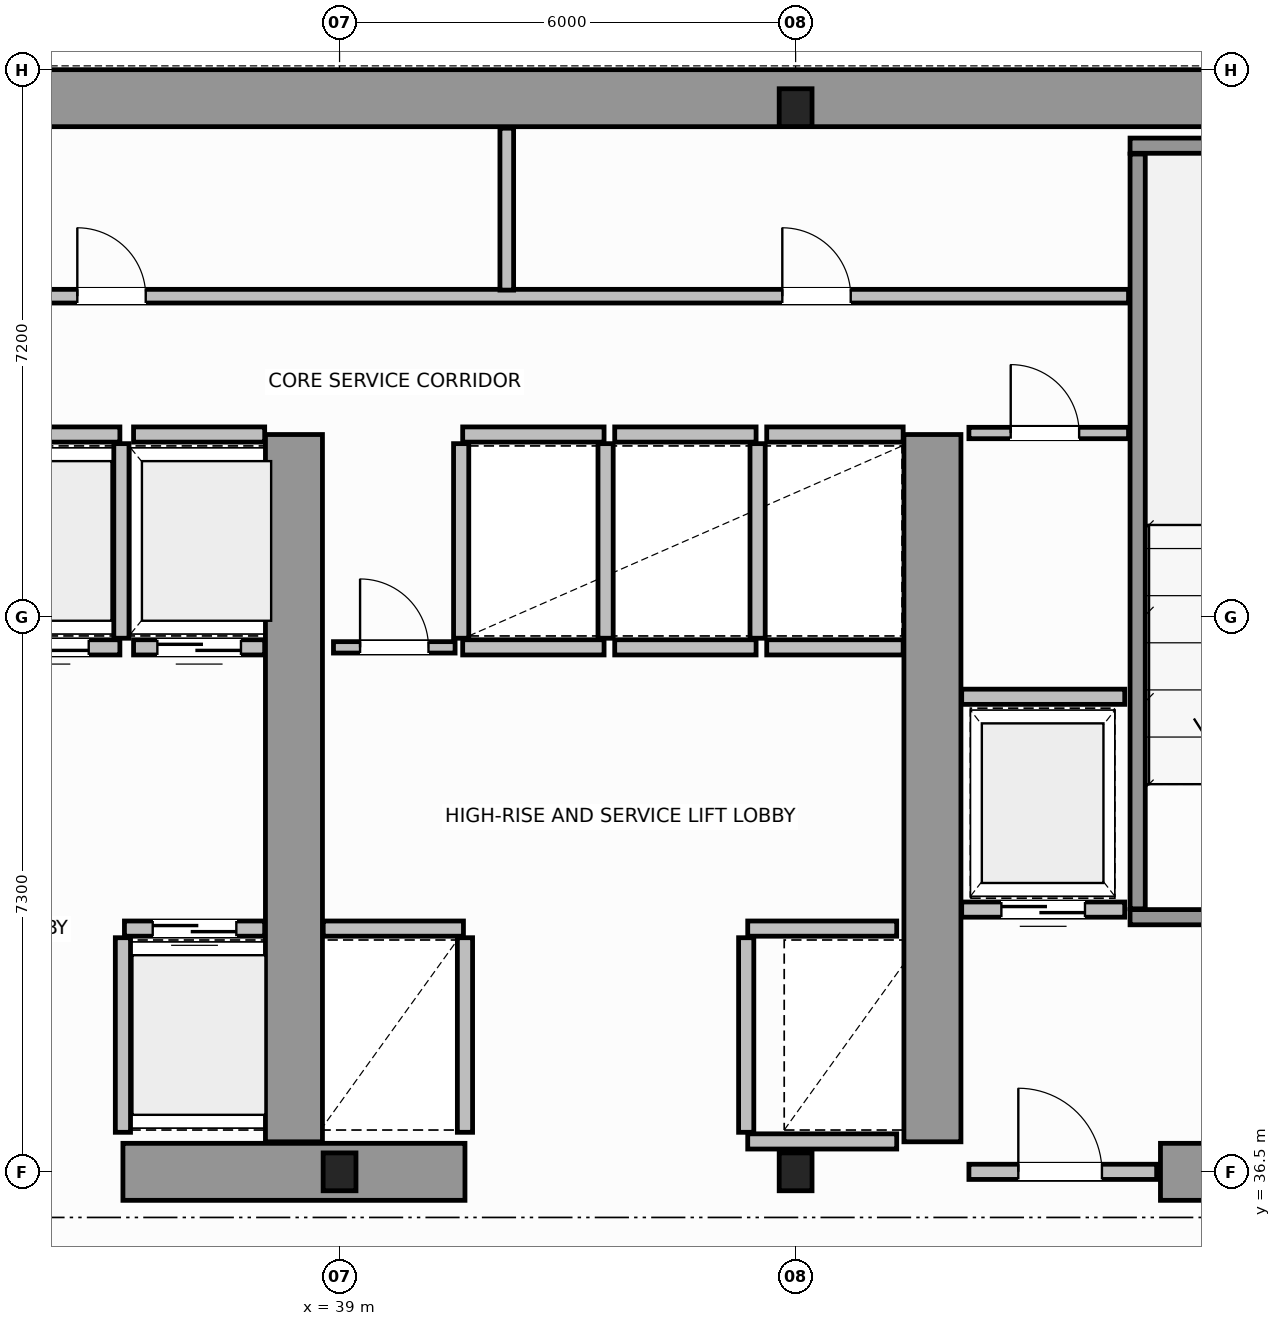
"""IFC4 building model, lengths in metres.
Left out: names, types, materials, properties, quantities, classifications, styles, units other than length and angle.
Written with IfcOpenShell. Run it as: python <this file> out.ifc"""

import sys

from ifc_helpers import new_model, si_unit, direction, frame, frame_2d, origin, origin_2d, place, context, subcontext, project, spatial, rectangle, i_section, extrude, source, transform, mapped, element, fill, save


model = new_model("IFC4")
c1 = context("Model", 3, precision=1e-05, world=origin(), true_north=direction((0.0, 1.0)))
c2 = subcontext(c1, "Body", "Model", "MODEL_VIEW")
j1 = project(units=[si_unit("LENGTHUNIT", "METRE"), si_unit("PLANEANGLEUNIT", "RADIAN")], contexts=[c1])
p1 = place(None, origin())
s1 = spatial("IfcSite", under=j1, at=p1, CompositionType="ELEMENT")
p2 = place(p1, origin())
s2 = spatial("IfcBuilding", under=s1, at=p2, CompositionType="ELEMENT")
p3 = place(p2, frame((0.0, 0.0, 145.2)))
s3 = spatial("IfcBuildingStorey", under=s2, at=p3, CompositionType="ELEMENT", Elevation=145.2)
m1 = source(origin(), c2, "Body", "SweptSolid", [
    extrude(i_section(OverallWidth=0.432, OverallDepth=0.498, WebThickness=0.055, FlangeThickness=0.068, FilletRadius=0.015, at=origin_2d()), origin(), (0.0, 0.0, 1.0), 3.8),
])
for number, where, z_axis, x_axis in (
    (1, (39.0, 36.5, 0.0), (0.0, 0.0, 1.0), (1.0, 0.0, 0.0)),
    (2, (45.0, 36.5, 0.0), (0.0, 0.0, 1.0), (1.0, 0.0, 0.0)),
    (3, (45.0, 50.5, 0.0), (0.0, 0.0, 1.0), (1.0, 0.0, 0.0)),
):
    element("IfcColumn", number, at=place(p3, frame(where, z_axis=z_axis, x_axis=x_axis)), inside=s3, PredefinedType="COLUMN", context=c2, shape_type="MappedRepresentation", body=[
        mapped(m1, transform((0.0, 0.0, 0.0), scale=1.0)),
    ])
p4 = place(p3, frame((34.002, 50.625, 0.0), z_axis=(0.0, 0.0, 1.0), x_axis=(1.0, 0.0, 0.0)))
e4 = element("IfcWall", 4, at=p4, inside=s3, PredefinedType="SHEAR", context=c2, shape_type="SweptSolid", body=[
    extrude(rectangle(XDim=19.619, YDim=0.75, at=frame_2d((9.81, 0.0))), origin(), (0.0, 0.0, 1.0), 3.8),
])
p5 = place(p3, frame((36.15, 36.5, 0.0), z_axis=(0.0, 0.0, 1.0), x_axis=(1.0, 0.0, 0.0)))
e5 = element("IfcWall", 5, at=p5, inside=s3, PredefinedType="SHEAR", context=c2, shape_type="SweptSolid", body=[
    extrude(rectangle(XDim=4.5, YDim=0.75, at=frame_2d((2.25, 0.0))), origin(), (0.0, 0.0, 1.0), 3.8),
])
p6 = place(p3, frame((49.8, 36.5, 0.0), z_axis=(0.0, 0.0, 1.0), x_axis=(1.0, 0.0, 0.0)))
e6 = element("IfcWall", 6, at=p6, inside=s3, PredefinedType="SHEAR", context=c2, shape_type="SweptSolid", body=[
    extrude(rectangle(XDim=3.805, YDim=0.75, at=frame_2d((1.902, 0.0))), origin(), (0.0, 0.0, 1.0), 2.34),
])
for number, where, z_axis, x_axis in (
    (7, (38.4, 36.895, 0.0), (0.0, 0.0, 1.0), (0.0, 1.0, 0.0)),
    (8, (46.8, 36.895, 0.0), (0.0, 0.0, 1.0), (0.0, 1.0, 0.0)),
):
    element("IfcWall", number, at=place(p3, frame(where, z_axis=z_axis, x_axis=x_axis)), inside=s3, PredefinedType="SHEAR", context=c2, shape_type="SweptSolid", body=[
        extrude(rectangle(XDim=9.305, YDim=0.75, at=frame_2d((4.652, 0.0))), origin(), (0.0, 0.0, 1.0), 3.8),
    ])
p7 = place(p3, frame((49.4, 39.85, 0.0), z_axis=(0.0, 0.0, 1.0), x_axis=(1.0, 0.0, 0.0)))
e9 = element("IfcWall", 9, at=p7, inside=s3, PredefinedType="SOLIDWALL", context=c2, shape_type="SweptSolid", body=[
    extrude(rectangle(XDim=4.225, YDim=0.2, at=frame_2d((2.113, 0.0))), origin(), (0.0, 0.0, 1.0), 3.8),
])
p8 = place(p7, frame((1.325, 0.0, 0.0)))
e10 = element("IfcOpeningElement", 10, at=p8, cuts=e9, PredefinedType="OPENING", context=c2, shape_type="SweptSolid", body=[
    extrude(rectangle(XDim=1.1, YDim=2.15, at=frame_2d((0.55, 1.075))), frame((0.0, 0.11, 0.0), z_axis=(0.0, -1.0, 0.0), x_axis=(1.0, 0.0, 0.0)), (0.0, 0.0, 1.0), 0.22),
])
p9 = place(p3, frame((49.4, 50.0, 0.0), z_axis=(0.0, 0.0, 1.0), x_axis=(1.0, 0.0, 0.0)))
e11 = element("IfcWall", 11, at=p9, inside=s3, PredefinedType="SOLIDWALL", context=c2, shape_type="SweptSolid", body=[
    extrude(rectangle(XDim=4.225, YDim=0.2, at=frame_2d((2.113, 0.0))), origin(), (0.0, 0.0, 1.0), 3.8),
])
p10 = place(p3, frame((49.5, 39.96, 0.0), z_axis=(0.0, 0.0, 1.0), x_axis=(0.0, 1.0, 0.0)))
e12 = element("IfcWall", 12, at=p10, inside=s3, PredefinedType="SOLIDWALL", context=c2, shape_type="SweptSolid", body=[
    extrude(rectangle(XDim=9.93, YDim=0.2, at=frame_2d((4.965, 0.0))), origin(), (0.0, 0.0, 1.0), 3.8),
])
p11 = place(p3, frame((47.28, 36.5, 0.0), z_axis=(0.0, 0.0, 1.0), x_axis=(1.0, 0.0, 0.0)))
e13 = element("IfcWall", 13, at=p11, inside=s3, PredefinedType="SOLIDWALL", context=c2, shape_type="SweptSolid", body=[
    extrude(rectangle(XDim=2.47, YDim=0.2, at=frame_2d((1.235, 0.0))), origin(), (0.0, 0.0, 1.0), 2.33),
])
p12 = place(p11, frame((0.65, 0.0, 0.0)))
e14 = element("IfcOpeningElement", 14, at=p12, cuts=e13, PredefinedType="OPENING", context=c2, shape_type="SweptSolid", body=[
    extrude(rectangle(XDim=1.1, YDim=2.15, at=frame_2d((0.55, 1.075))), frame((0.0, 0.11, 0.0), z_axis=(0.0, -1.0, 0.0), x_axis=(1.0, 0.0, 0.0)), (0.0, 0.0, 1.0), 0.22),
])
p13 = place(p3, frame((36.17, 39.7, 0.0), z_axis=(0.0, 0.0, 1.0), x_axis=(1.0, 0.0, 0.0)))
e15 = element("IfcWall", 15, at=p13, inside=s3, PredefinedType="SOLIDWALL", context=c2, shape_type="SweptSolid", body=[
    extrude(rectangle(XDim=1.845, YDim=0.2, at=frame_2d((0.922, 0.0))), origin(), (0.0, 0.0, 1.0), 3.54),
])
p14 = place(p13, frame((0.372, 0.0, 0.0)))
e16 = element("IfcOpeningElement", 16, at=p14, cuts=e15, PredefinedType="OPENING", context=c2, shape_type="SweptSolid", body=[
    extrude(rectangle(XDim=1.1, YDim=2.15, at=frame_2d((0.55, 1.075))), frame((0.0, 0.11, 0.0), z_axis=(0.0, -1.0, 0.0), x_axis=(1.0, 0.0, 0.0)), (0.0, 0.0, 1.0), 0.22),
])
p15 = place(p3, frame((36.15, 37.02, 0.0), z_axis=(0.0, 0.0, 1.0), x_axis=(0.0, 1.0, 0.0)))
e17 = element("IfcWall", 17, at=p15, inside=s3, PredefinedType="SOLIDWALL", context=c2, shape_type="SweptSolid", body=[
    extrude(rectangle(XDim=2.56, YDim=0.2, at=frame_2d((1.28, 0.0))), origin(), (0.0, 0.0, 1.0), 3.54),
])
p16 = place(p3, frame((34.19, 43.4, 0.0), z_axis=(0.0, 0.0, 1.0), x_axis=(1.0, 0.0, 0.0)))
e18 = element("IfcWall", 18, at=p16, inside=s3, PredefinedType="SOLIDWALL", context=c2, shape_type="SweptSolid", body=[
    extrude(rectangle(XDim=1.92, YDim=0.2, at=frame_2d((0.96, 0.0))), origin(), (0.0, 0.0, 1.0), 3.54),
])
p17 = place(p16, frame((0.41, 0.0, 0.0)))
e19 = element("IfcOpeningElement", 19, at=p17, cuts=e18, PredefinedType="OPENING", context=c2, shape_type="SweptSolid", body=[
    extrude(rectangle(XDim=1.1, YDim=2.15, at=frame_2d((0.55, 1.075))), frame((0.0, 0.11, 0.0), z_axis=(0.0, -1.0, 0.0), x_axis=(1.0, 0.0, 0.0)), (0.0, 0.0, 1.0), 0.22),
])
p18 = place(p3, frame((34.19, 46.2, 0.0), z_axis=(0.0, 0.0, 1.0), x_axis=(1.0, 0.0, 0.0)))
e20 = element("IfcWall", 20, at=p18, inside=s3, PredefinedType="SOLIDWALL", context=c2, shape_type="SweptSolid", body=[
    extrude(rectangle(XDim=1.92, YDim=0.2, at=frame_2d((0.96, 0.0))), origin(), (0.0, 0.0, 1.0), 3.54),
])
p19 = place(p3, frame((36.13, 43.52, 0.0), z_axis=(0.0, 0.0, 1.0), x_axis=(0.0, 1.0, 0.0)))
e21 = element("IfcWall", 21, at=p19, inside=s3, PredefinedType="SOLIDWALL", context=c2, shape_type="SweptSolid", body=[
    extrude(rectangle(XDim=2.56, YDim=0.2, at=frame_2d((1.28, 0.0))), origin(), (0.0, 0.0, 1.0), 3.54),
])
p20 = place(p3, frame((36.29, 43.4, 0.0), z_axis=(0.0, 0.0, 1.0), x_axis=(1.0, 0.0, 0.0)))
e22 = element("IfcWall", 22, at=p20, inside=s3, PredefinedType="SOLIDWALL", context=c2, shape_type="SweptSolid", body=[
    extrude(rectangle(XDim=1.725, YDim=0.2, at=frame_2d((0.862, 0.0))), origin(), (0.0, 0.0, 1.0), 3.54),
])
p21 = place(p20, frame((0.313, 0.0, 0.0)))
e23 = element("IfcOpeningElement", 23, at=p21, cuts=e22, PredefinedType="OPENING", context=c2, shape_type="SweptSolid", body=[
    extrude(rectangle(XDim=1.1, YDim=2.15, at=frame_2d((0.55, 1.075))), frame((0.0, 0.11, 0.0), z_axis=(0.0, -1.0, 0.0), x_axis=(1.0, 0.0, 0.0)), (0.0, 0.0, 1.0), 0.22),
])
p22 = place(p3, frame((36.29, 46.2, 0.0), z_axis=(0.0, 0.0, 1.0), x_axis=(1.0, 0.0, 0.0)))
e24 = element("IfcWall", 24, at=p22, inside=s3, PredefinedType="SOLIDWALL", context=c2, shape_type="SweptSolid", body=[
    extrude(rectangle(XDim=1.725, YDim=0.2, at=frame_2d((0.862, 0.0))), origin(), (0.0, 0.0, 1.0), 3.54),
])
p23 = place(p3, frame((38.785, 39.7, 0.0), z_axis=(0.0, 0.0, 1.0), x_axis=(1.0, 0.0, 0.0)))
e25 = element("IfcWall", 25, at=p23, inside=s3, PredefinedType="SOLIDWALL", context=c2, shape_type="SweptSolid", body=[
    extrude(rectangle(XDim=1.845, YDim=0.2, at=frame_2d((0.922, 0.0))), origin(), (0.0, 0.0, 1.0), 3.54),
])
p24 = place(p3, frame((40.65, 37.02, 0.0), z_axis=(0.0, 0.0, 1.0), x_axis=(0.0, 1.0, 0.0)))
e26 = element("IfcWall", 26, at=p24, inside=s3, PredefinedType="SOLIDWALL", context=c2, shape_type="SweptSolid", body=[
    extrude(rectangle(XDim=2.56, YDim=0.2, at=frame_2d((1.28, 0.0))), origin(), (0.0, 0.0, 1.0), 3.54),
])
p25 = place(p3, frame((44.37, 39.7, 0.0), z_axis=(0.0, 0.0, 1.0), x_axis=(1.0, 0.0, 0.0)))
e27 = element("IfcWall", 27, at=p25, inside=s3, PredefinedType="SOLIDWALL", context=c2, shape_type="SweptSolid", body=[
    extrude(rectangle(XDim=1.96, YDim=0.2, at=frame_2d((0.98, 0.0))), origin(), (0.0, 0.0, 1.0), 3.54),
])
p26 = place(p3, frame((44.37, 36.9, 0.0), z_axis=(0.0, 0.0, 1.0), x_axis=(1.0, 0.0, 0.0)))
e28 = element("IfcWall", 28, at=p26, inside=s3, PredefinedType="SOLIDWALL", context=c2, shape_type="SweptSolid", body=[
    extrude(rectangle(XDim=1.96, YDim=0.2, at=frame_2d((0.98, 0.0))), origin(), (0.0, 0.0, 1.0), 2.33),
])
p27 = place(p3, frame((44.35, 37.02, 0.0), z_axis=(0.0, 0.0, 1.0), x_axis=(0.0, 1.0, 0.0)))
e29 = element("IfcWall", 29, at=p27, inside=s3, PredefinedType="SOLIDWALL", context=c2, shape_type="SweptSolid", body=[
    extrude(rectangle(XDim=2.56, YDim=0.2, at=frame_2d((1.28, 0.0))), origin(), (0.0, 0.0, 1.0), 3.54),
])
for number, where, z_axis, x_axis in (
    (30, (40.62, 43.4, 0.0), (0.0, 0.0, 1.0), (1.0, 0.0, 0.0)),
    (31, (40.62, 46.2, 0.0), (0.0, 0.0, 1.0), (1.0, 0.0, 0.0)),
):
    element("IfcWall", number, at=place(p3, frame(where, z_axis=z_axis, x_axis=x_axis)), inside=s3, PredefinedType="SOLIDWALL", context=c2, shape_type="SweptSolid", body=[
        extrude(rectangle(XDim=1.86, YDim=0.2, at=frame_2d((0.93, 0.0))), origin(), (0.0, 0.0, 1.0), 3.54),
    ])
for number, where, z_axis, x_axis in (
    (32, (40.6, 43.52, 0.0), (0.0, 0.0, 1.0), (0.0, 1.0, 0.0)),
    (33, (42.5, 43.52, 0.0), (0.0, 0.0, 1.0), (0.0, 1.0, 0.0)),
):
    element("IfcWall", number, at=place(p3, frame(where, z_axis=z_axis, x_axis=x_axis)), inside=s3, PredefinedType="SOLIDWALL", context=c2, shape_type="SweptSolid", body=[
        extrude(rectangle(XDim=2.56, YDim=0.2, at=frame_2d((1.28, 0.0))), origin(), (0.0, 0.0, 1.0), 3.54),
    ])
for number, where, z_axis, x_axis in (
    (34, (42.62, 43.4, 0.0), (0.0, 0.0, 1.0), (1.0, 0.0, 0.0)),
    (35, (42.62, 46.2, 0.0), (0.0, 0.0, 1.0), (1.0, 0.0, 0.0)),
):
    element("IfcWall", number, at=place(p3, frame(where, z_axis=z_axis, x_axis=x_axis)), inside=s3, PredefinedType="SOLIDWALL", context=c2, shape_type="SweptSolid", body=[
        extrude(rectangle(XDim=1.86, YDim=0.2, at=frame_2d((0.93, 0.0))), origin(), (0.0, 0.0, 1.0), 3.54),
    ])
p28 = place(p3, frame((44.5, 43.52, 0.0), z_axis=(0.0, 0.0, 1.0), x_axis=(0.0, 1.0, 0.0)))
e36 = element("IfcWall", 36, at=p28, inside=s3, PredefinedType="SOLIDWALL", context=c2, shape_type="SweptSolid", body=[
    extrude(rectangle(XDim=2.56, YDim=0.2, at=frame_2d((1.28, 0.0))), origin(), (0.0, 0.0, 1.0), 3.54),
])
for number, where, z_axis, x_axis in (
    (37, (44.62, 43.4, 0.0), (0.0, 0.0, 1.0), (1.0, 0.0, 0.0)),
    (38, (44.62, 46.2, 0.0), (0.0, 0.0, 1.0), (1.0, 0.0, 0.0)),
):
    element("IfcWall", number, at=place(p3, frame(where, z_axis=z_axis, x_axis=x_axis)), inside=s3, PredefinedType="SOLIDWALL", context=c2, shape_type="SweptSolid", body=[
        extrude(rectangle(XDim=1.795, YDim=0.2, at=frame_2d((0.897, 0.0))), origin(), (0.0, 0.0, 1.0), 3.54),
    ])
p29 = place(p3, frame((47.185, 39.95, 0.0), z_axis=(0.0, 0.0, 1.0), x_axis=(1.0, 0.0, 0.0)))
e39 = element("IfcWall", 39, at=p29, inside=s3, PredefinedType="SOLIDWALL", context=c2, shape_type="SweptSolid", body=[
    extrude(rectangle(XDim=2.145, YDim=0.2, at=frame_2d((1.073, 0.0))), origin(), (0.0, 0.0, 1.0), 3.54),
])
p30 = place(p29, frame((0.522, 0.0, 0.0)))
e40 = element("IfcOpeningElement", 40, at=p30, cuts=e39, PredefinedType="OPENING", context=c2, shape_type="SweptSolid", body=[
    extrude(rectangle(XDim=1.1, YDim=2.15, at=frame_2d((0.55, 1.075))), frame((0.0, 0.11, 0.0), z_axis=(0.0, -1.0, 0.0), x_axis=(1.0, 0.0, 0.0)), (0.0, 0.0, 1.0), 0.22),
])
p31 = place(p3, frame((47.185, 42.75, 0.0), z_axis=(0.0, 0.0, 1.0), x_axis=(1.0, 0.0, 0.0)))
e41 = element("IfcWall", 41, at=p31, inside=s3, PredefinedType="SOLIDWALL", context=c2, shape_type="SweptSolid", body=[
    extrude(rectangle(XDim=2.145, YDim=0.2, at=frame_2d((1.073, 0.0))), origin(), (0.0, 0.0, 1.0), 3.54),
])
p32 = place(p3, frame((47.28, 46.22, 0.0), z_axis=(0.0, 0.0, 1.0), x_axis=(1.0, 0.0, 0.0)))
e42 = element("IfcWall", 42, at=p32, inside=s3, PredefinedType="PARTITIONING", context=c2, shape_type="SweptSolid", body=[
    extrude(rectangle(XDim=2.1, YDim=0.15, at=frame_2d((1.05, 0.0))), origin(), (0.0, 0.0, 1.0), 3.54),
])
p33 = place(p32, frame((0.55, 0.0, 0.0)))
e43 = element("IfcOpeningElement", 43, at=p33, cuts=e42, PredefinedType="OPENING", context=c2, shape_type="SweptSolid", body=[
    extrude(rectangle(XDim=0.9, YDim=2.1, at=frame_2d((0.45, 1.05))), frame((0.0, 0.085, 0.0), z_axis=(0.0, -1.0, 0.0), x_axis=(1.0, 0.0, 0.0)), (0.0, 0.0, 1.0), 0.17),
])
p34 = place(p3, frame((38.92, 43.4, 0.0), z_axis=(0.0, 0.0, 1.0), x_axis=(1.0, 0.0, 0.0)))
e44 = element("IfcWall", 44, at=p34, inside=s3, PredefinedType="PARTITIONING", context=c2, shape_type="SweptSolid", body=[
    extrude(rectangle(XDim=1.6, YDim=0.15, at=frame_2d((0.8, 0.0))), origin(), (0.0, 0.0, 1.0), 3.54),
])
p35 = place(p34, frame((0.35, 0.0, 0.0)))
e45 = element("IfcOpeningElement", 45, at=p35, cuts=e44, PredefinedType="OPENING", context=c2, shape_type="SweptSolid", body=[
    extrude(rectangle(XDim=0.9, YDim=2.1, at=frame_2d((0.45, 1.05))), frame((0.0, 0.085, 0.0), z_axis=(0.0, -1.0, 0.0), x_axis=(1.0, 0.0, 0.0)), (0.0, 0.0, 1.0), 0.17),
])
p36 = place(p3, frame((18.62, 48.02, 0.0), z_axis=(0.0, 0.0, 1.0), x_axis=(1.0, 0.0, 0.0)))
e46 = element("IfcWall", 46, at=p36, inside=s3, PredefinedType="PLUMBINGWALL", context=c2, shape_type="SweptSolid", body=[
    extrude(rectangle(XDim=30.76, YDim=0.18, at=frame_2d((15.38, 0.0))), origin(), (0.0, 0.0, 1.0), 3.54),
])
p37 = place(p36, frame((1.955, 0.0, 0.0)))
e47 = element("IfcOpeningElement", 47, at=p37, cuts=e46, PredefinedType="OPENING", context=c2, shape_type="SweptSolid", body=[
    extrude(rectangle(XDim=0.9, YDim=2.15, at=frame_2d((0.45, 1.075))), frame((0.0, 0.1, 0.0), z_axis=(0.0, -1.0, 0.0), x_axis=(1.0, 0.0, 0.0)), (0.0, 0.0, 1.0), 0.2),
])
p38 = place(p36, frame((8.03, 0.0, 0.0)))
e48 = element("IfcOpeningElement", 48, at=p38, cuts=e46, PredefinedType="OPENING", context=c2, shape_type="SweptSolid", body=[
    extrude(rectangle(XDim=0.9, YDim=2.15, at=frame_2d((0.45, 1.075))), frame((0.0, 0.1, 0.0), z_axis=(0.0, -1.0, 0.0), x_axis=(1.0, 0.0, 0.0)), (0.0, 0.0, 1.0), 0.2),
])
p39 = place(p36, frame((16.93, 0.0, 0.0)))
e49 = element("IfcOpeningElement", 49, at=p39, cuts=e46, PredefinedType="OPENING", context=c2, shape_type="SweptSolid", body=[
    extrude(rectangle(XDim=0.9, YDim=2.15, at=frame_2d((0.45, 1.075))), frame((0.0, 0.1, 0.0), z_axis=(0.0, -1.0, 0.0), x_axis=(1.0, 0.0, 0.0)), (0.0, 0.0, 1.0), 0.2),
])
p40 = place(p36, frame((26.205, 0.0, 0.0)))
e50 = element("IfcOpeningElement", 50, at=p40, cuts=e46, PredefinedType="OPENING", context=c2, shape_type="SweptSolid", body=[
    extrude(rectangle(XDim=0.9, YDim=2.15, at=frame_2d((0.45, 1.075))), frame((0.0, 0.1, 0.0), z_axis=(0.0, -1.0, 0.0), x_axis=(1.0, 0.0, 0.0)), (0.0, 0.0, 1.0), 0.2),
])
p41 = place(p3, frame((41.2, 48.1, 0.0), z_axis=(0.0, 0.0, 1.0), x_axis=(0.0, 1.0, 0.0)))
e51 = element("IfcWall", 51, at=p41, inside=s3, PredefinedType="PLUMBINGWALL", context=c2, shape_type="SweptSolid", body=[
    extrude(rectangle(XDim=2.13, YDim=0.18, at=frame_2d((1.065, 0.0))), origin(), (0.0, 0.0, 1.0), 3.54),
])
m2 = source(origin(), c2, "Body", "SweptSolid", [
    extrude(rectangle(XDim=1.1, YDim=2.15, at=frame_2d((0.55, 1.075))), frame((0.0, 0.025, 0.0), z_axis=(0.0, -1.0, 0.0), x_axis=(1.0, 0.0, 0.0)), (0.0, 0.0, 1.0), 0.05),
])
p42 = place(p12, origin())
e52 = element("IfcDoor", 52, at=p42, inside=s3, OperationType="SINGLE_SWING_LEFT", PredefinedType="DOOR", context=c2, shape_type="MappedRepresentation", body=[
    mapped(m2, transform((0.0, 0.0, 0.0), scale=1.0)),
])
fill(e14, e52)
p43 = place(p14, origin())
e53 = element("IfcDoor", 53, at=p43, inside=s3, OperationType="DOUBLE_DOOR_SLIDING", PredefinedType="DOOR", context=c2, shape_type="MappedRepresentation", body=[
    mapped(m2, transform((0.0, 0.0, 0.0), scale=1.0)),
])
fill(e16, e53)
p44 = place(p17, origin())
e54 = element("IfcDoor", 54, at=p44, inside=s3, OperationType="DOUBLE_DOOR_SLIDING", PredefinedType="DOOR", context=c2, shape_type="MappedRepresentation", body=[
    mapped(m2, transform((0.0, 0.0, 0.0), scale=1.0)),
])
fill(e19, e54)
p45 = place(p21, origin())
e55 = element("IfcDoor", 55, at=p45, inside=s3, OperationType="DOUBLE_DOOR_SLIDING", PredefinedType="DOOR", context=c2, shape_type="MappedRepresentation", body=[
    mapped(m2, transform((0.0, 0.0, 0.0), scale=1.0)),
])
fill(e23, e55)
p46 = place(p30, origin())
e56 = element("IfcDoor", 56, at=p46, inside=s3, OperationType="DOUBLE_DOOR_SLIDING", PredefinedType="DOOR", context=c2, shape_type="MappedRepresentation", body=[
    mapped(m2, transform((0.0, 0.0, 0.0), scale=1.0)),
])
fill(e40, e56)
m3 = source(origin(), c2, "Body", "SweptSolid", [
    extrude(rectangle(XDim=0.9, YDim=2.1, at=frame_2d((0.45, 1.05))), frame((0.0, 0.025, 0.0), z_axis=(0.0, -1.0, 0.0), x_axis=(1.0, 0.0, 0.0)), (0.0, 0.0, 1.0), 0.05),
])
p47 = place(p33, origin())
e57 = element("IfcDoor", 57, at=p47, inside=s3, OperationType="SINGLE_SWING_RIGHT", PredefinedType="DOOR", context=c2, shape_type="MappedRepresentation", body=[
    mapped(m3, transform((0.0, 0.0, 0.0), scale=1.0)),
])
fill(e43, e57)
p48 = place(p35, origin())
e58 = element("IfcDoor", 58, at=p48, inside=s3, OperationType="SINGLE_SWING_LEFT", PredefinedType="DOOR", context=c2, shape_type="MappedRepresentation", body=[
    mapped(m3, transform((0.0, 0.0, 0.0), scale=1.0)),
])
fill(e45, e58)
m4 = source(origin(), c2, "Body", "SweptSolid", [
    extrude(rectangle(XDim=0.9, YDim=2.15, at=frame_2d((0.45, 1.075))), frame((0.0, 0.025, 0.0), z_axis=(0.0, -1.0, 0.0), x_axis=(1.0, 0.0, 0.0)), (0.0, 0.0, 1.0), 0.05),
])
p49 = place(p39, origin())
e59 = element("IfcDoor", 59, at=p49, inside=s3, OperationType="SINGLE_SWING_LEFT", PredefinedType="DOOR", context=c2, shape_type="MappedRepresentation", body=[
    mapped(m4, transform((0.0, 0.0, 0.0), scale=1.0)),
])
fill(e49, e59)
p50 = place(p40, origin())
e60 = element("IfcDoor", 60, at=p50, inside=s3, OperationType="SINGLE_SWING_RIGHT", PredefinedType="DOOR", context=c2, shape_type="MappedRepresentation", body=[
    mapped(m4, transform((0.0, 0.0, 0.0), scale=1.0)),
])
fill(e50, e60)
save(model, sys.argv[1])
